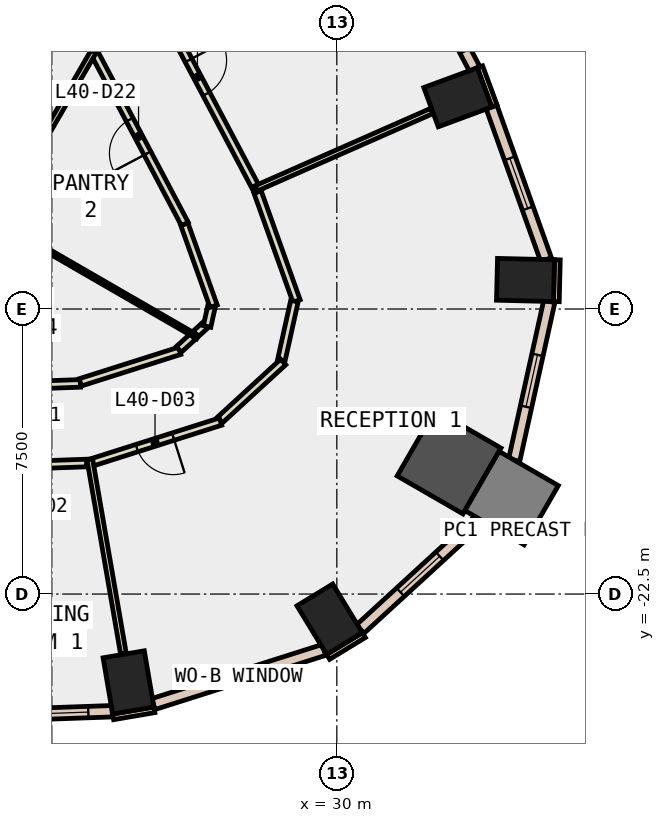
"""IFC4 building model, lengths in metres.
Left out: names, types, materials, properties, quantities, classifications, styles, units other than length and angle.
Written with IfcOpenShell. Run it as: python <this file> out.ifc"""

import sys

from ifc_helpers import new_model, si_unit, direction, frame, frame_2d, origin, origin_2d, place, context, subcontext, project, spatial, rectangle, extrude, element, fill, save


model = new_model("IFC4")
c1 = context("Model", 3, precision=1e-05, world=origin(), true_north=direction((0.0, 1.0)))
c2 = subcontext(c1, "Body", "Model", "MODEL_VIEW")
j1 = project(units=[si_unit("LENGTHUNIT", "METRE"), si_unit("PLANEANGLEUNIT", "RADIAN")], contexts=[c1])
p1 = place(None, origin())
s1 = spatial("IfcSite", under=j1, at=p1, CompositionType="ELEMENT")
p2 = place(p1, origin())
s2 = spatial("IfcBuilding", under=s1, at=p2, CompositionType="ELEMENT")
p3 = place(p2, frame((0.0, 0.0, 180.2)))
s3 = spatial("IfcBuildingStorey", under=s2, at=p3, CompositionType="ELEMENT", Elevation=180.2)
for number, where, z_axis, x_axis in (
    (1, (24.518, -24.825, -0.4), (0.0, 0.0, 1.0), (0.986, 0.168, 0.0)),
    (2, (29.812, -23.163, -0.4), (0.0, 0.0, 1.0), (0.854, 0.521, 0.0)),
):
    element("IfcColumn", number, at=place(p3, frame(where, z_axis=z_axis, x_axis=x_axis)), inside=s3, PredefinedType="COLUMN", context=c2, shape_type="SweptSolid", body=[
        extrude(rectangle(XDim=1.1, YDim=1.5, at=origin_2d()), origin(), (0.0, 0.0, 1.0), 4.0),
    ])
p4 = place(p3, frame((32.954, -19.025, -0.4), z_axis=(0.0, 0.0, 1.0), x_axis=(-0.866025403784, 0.5, 0.0)))
e3 = element("IfcColumn", 3, at=p4, inside=s3, PredefinedType="COLUMN", context=c2, shape_type="SweptSolid", body=[
    extrude(rectangle(XDim=2.0, YDim=2.0, at=origin_2d()), origin(), (0.0, 0.0, 1.0), 4.0),
])
for number, where, z_axis, x_axis in (
    (4, (34.965, -14.236, -0.4), (0.0, 0.0, 1.0), (0.024, 1.0, 0.0)),
    (5, (33.183, -9.429, -0.4), (0.0, 0.0, 1.0), (-0.347, 0.938, 0.0)),
):
    element("IfcColumn", number, at=place(p3, frame(where, z_axis=z_axis, x_axis=x_axis)), inside=s3, PredefinedType="COLUMN", context=c2, shape_type="SweptSolid", body=[
        extrude(rectangle(XDim=1.1, YDim=1.5, at=origin_2d()), origin(), (0.0, 0.0, 1.0), 4.0),
    ])
p5 = place(p3, frame((34.599, -19.975, -0.4), z_axis=(0.0, 0.0, 1.0), x_axis=(-0.866025403784, 0.5, 0.0)))
e6 = element("IfcColumn", 6, at=p5, inside=s3, PredefinedType="COLUMN", context=c2, shape_type="SweptSolid", body=[
    extrude(rectangle(XDim=1.8, YDim=1.8, at=origin_2d()), origin(), (0.0, 0.0, 1.0), 4.0),
])
p6 = place(p3, frame((34.147, -9.659, 0.0), z_axis=(0.0, 0.0, 1.0), x_axis=(-0.346229846278, 0.938149718087, 0.0)))
e7 = element("IfcWall", 7, at=p6, inside=s3, PredefinedType="STANDARD", context=c2, shape_type="SweptSolid", body=[
    extrude(rectangle(XDim=1.1, YDim=0.15, at=frame_2d((0.55, 0.0))), origin(), (0.0, 0.0, 1.0), 3.6),
])
p7 = place(p3, frame((24.114, -25.731, 0.0), z_axis=(0.0, 0.0, 1.0), x_axis=(0.985763338892, 0.168138751323, 0.0)))
e8 = element("IfcWall", 8, at=p7, inside=s3, PredefinedType="STANDARD", context=c2, shape_type="SweptSolid", body=[
    extrude(rectangle(XDim=1.101, YDim=0.15, at=frame_2d((0.55, 0.0))), origin(), (0.0, 0.0, 1.0), 3.6),
])
p8 = place(p3, frame((29.772, -24.153, 0.0), z_axis=(0.0, 0.0, 1.0), x_axis=(0.854005542721, 0.520263907071, 0.0)))
e9 = element("IfcWall", 9, at=p8, inside=s3, PredefinedType="STANDARD", context=c2, shape_type="SweptSolid", body=[
    extrude(rectangle(XDim=1.099, YDim=0.15, at=frame_2d((0.55, 0.0))), origin(), (0.0, 0.0, 1.0), 3.6),
])
p9 = place(p3, frame((35.777, -14.806, 0.0), z_axis=(0.0, 0.0, 1.0), x_axis=(0.023522901136, 0.999723298279, 0.0)))
e10 = element("IfcWall", 10, at=p9, inside=s3, PredefinedType="STANDARD", context=c2, shape_type="SweptSolid", body=[
    extrude(rectangle(XDim=1.1, YDim=0.15, at=frame_2d((0.55, 0.0))), origin(), (0.0, 0.0, 1.0), 3.6),
])
p10 = place(p3, frame((16.778, -25.843, 0.0), z_axis=(0.0, 0.0, 1.0), x_axis=(0.999368368263, 0.035536805082, 0.0)))
e11 = element("IfcWall", 11, at=p10, inside=s3, PredefinedType="STANDARD", context=c2, shape_type="SweptSolid", body=[
    extrude(rectangle(XDim=7.317, YDim=0.3, at=frame_2d((3.658, 0.0))), origin(), (0.0, 0.0, 1.0), 3.6),
])
p11 = place(p10, frame((0.629, 0.0, 0.9)))
e12 = element("IfcOpeningElement", 12, at=p11, cuts=e11, PredefinedType="OPENING", context=c2, shape_type="SweptSolid", body=[
    extrude(rectangle(XDim=2.4, YDim=2.6, at=frame_2d((1.2, 1.3))), frame((0.0, 0.16, 0.0), z_axis=(0.0, -1.0, 0.0), x_axis=(1.0, 0.0, 0.0)), (0.0, 0.0, 1.0), 0.32),
])
p12 = place(p10, frame((4.287, 0.0, 0.9)))
e13 = element("IfcOpeningElement", 13, at=p12, cuts=e11, PredefinedType="OPENING", context=c2, shape_type="SweptSolid", body=[
    extrude(rectangle(XDim=2.4, YDim=2.6, at=frame_2d((1.2, 1.3))), frame((0.0, 0.16, 0.0), z_axis=(0.0, -1.0, 0.0), x_axis=(1.0, 0.0, 0.0)), (0.0, 0.0, 1.0), 0.32),
])
p13 = place(p3, frame((25.172, -25.395, 0.0), z_axis=(0.0, 0.0, 1.0), x_axis=(0.953145379857, 0.302512619337, 0.0)))
e14 = element("IfcWall", 14, at=p13, inside=s3, PredefinedType="STANDARD", context=c2, shape_type="SweptSolid", body=[
    extrude(rectangle(XDim=4.711, YDim=0.3, at=frame_2d((2.355, 0.0))), origin(), (0.0, 0.0, 1.0), 3.6),
])
p14 = place(p13, frame((1.655, 0.0, 0.9)))
e15 = element("IfcOpeningElement", 15, at=p14, cuts=e14, PredefinedType="OPENING", context=c2, shape_type="SweptSolid", body=[
    extrude(rectangle(XDim=1.4, YDim=2.6, at=frame_2d((0.7, 1.3))), frame((0.0, 0.16, 0.0), z_axis=(0.0, -1.0, 0.0), x_axis=(1.0, 0.0, 0.0)), (0.0, 0.0, 1.0), 0.32),
])
p15 = place(p3, frame((30.614, -23.423, 0.0), z_axis=(0.0, 0.0, 1.0), x_axis=(0.737279680174, 0.675587650274, 0.0)))
e16 = element("IfcWall", 16, at=p15, inside=s3, PredefinedType="STANDARD", context=c2, shape_type="SweptSolid", body=[
    extrude(rectangle(XDim=4.278, YDim=0.3, at=frame_2d((2.139, 0.0))), origin(), (0.0, 0.0, 1.0), 3.6),
])
p16 = place(p15, frame((1.439, 0.0, 0.9)))
e17 = element("IfcOpeningElement", 17, at=p16, cuts=e16, PredefinedType="OPENING", context=c2, shape_type="SweptSolid", body=[
    extrude(rectangle(XDim=1.4, YDim=2.6, at=frame_2d((0.7, 1.3))), frame((0.0, 0.16, 0.0), z_axis=(0.0, -1.0, 0.0), x_axis=(1.0, 0.0, 0.0)), (0.0, 0.0, 1.0), 0.32),
])
p17 = place(p3, frame((34.667, -18.976, 0.0), z_axis=(0.0, 0.0, 1.0), x_axis=(0.216102175589, 0.976370754225, 0.0)))
e18 = element("IfcWall", 18, at=p17, inside=s3, PredefinedType="STANDARD", context=c2, shape_type="SweptSolid", body=[
    extrude(rectangle(XDim=4.276, YDim=0.3, at=frame_2d((2.138, 0.0))), origin(), (0.0, 0.0, 1.0), 3.6),
])
p18 = place(p17, frame((1.438, 0.0, 0.9)))
e19 = element("IfcOpeningElement", 19, at=p18, cuts=e18, PredefinedType="OPENING", context=c2, shape_type="SweptSolid", body=[
    extrude(rectangle(XDim=1.4, YDim=2.6, at=frame_2d((0.7, 1.3))), frame((0.0, 0.16, 0.0), z_axis=(0.0, -1.0, 0.0), x_axis=(1.0, 0.0, 0.0)), (0.0, 0.0, 1.0), 0.32),
])
p19 = place(p3, frame((35.506, -13.7, 0.0), z_axis=(0.0, 0.0, 1.0), x_axis=(-0.336652028742, 0.941629126325, 0.0)))
e20 = element("IfcWall", 20, at=p19, inside=s3, PredefinedType="STANDARD", context=c2, shape_type="SweptSolid", body=[
    extrude(rectangle(XDim=4.263, YDim=0.3, at=frame_2d((2.131, 0.0))), origin(), (0.0, 0.0, 1.0), 3.6),
])
p20 = place(p19, frame((1.431, 0.0, 0.9)))
e21 = element("IfcOpeningElement", 21, at=p20, cuts=e20, PredefinedType="OPENING", context=c2, shape_type="SweptSolid", body=[
    extrude(rectangle(XDim=1.4, YDim=2.6, at=frame_2d((0.7, 1.3))), frame((0.0, 0.16, 0.0), z_axis=(0.0, -1.0, 0.0), x_axis=(1.0, 0.0, 0.0)), (0.0, 0.0, 1.0), 0.32),
])
p21 = place(p3, frame((33.626, -8.68, 0.0), z_axis=(0.0, 0.0, 1.0), x_axis=(-0.467572383403, 0.883954787463, 0.0)))
e22 = element("IfcWall", 22, at=p21, inside=s3, PredefinedType="STANDARD", context=c2, shape_type="SweptSolid", body=[
    extrude(rectangle(XDim=6.119, YDim=0.3, at=frame_2d((3.06, 0.0))), origin(), (0.0, 0.0, 1.0), 3.6),
])
p22 = place(p21, frame((0.53, 0.0, 0.9)))
e23 = element("IfcOpeningElement", 23, at=p22, cuts=e22, PredefinedType="OPENING", context=c2, shape_type="SweptSolid", body=[
    extrude(rectangle(XDim=2.0, YDim=2.6, at=frame_2d((1.0, 1.3))), frame((0.0, 0.16, 0.0), z_axis=(0.0, -1.0, 0.0), x_axis=(1.0, 0.0, 0.0)), (0.0, 0.0, 1.0), 0.32),
])
p23 = place(p21, frame((3.589, 0.0, 0.9)))
e24 = element("IfcOpeningElement", 24, at=p23, cuts=e22, PredefinedType="OPENING", context=c2, shape_type="SweptSolid", body=[
    extrude(rectangle(XDim=2.0, YDim=2.6, at=frame_2d((1.0, 1.3))), frame((0.0, 0.16, 0.0), z_axis=(0.0, -1.0, 0.0), x_axis=(1.0, 0.0, 0.0)), (0.0, 0.0, 1.0), 0.32),
])
p24 = place(p3, frame((18.534, -17.125, 0.0), z_axis=(0.0, 0.0, 1.0), x_axis=(0.999367128298, 0.035571658351, 0.0)))
e25 = element("IfcWall", 25, at=p24, inside=s3, PredefinedType="PARTITIONING", context=c2, shape_type="SweptSolid", body=[
    extrude(rectangle(XDim=4.722, YDim=0.2, at=frame_2d((2.361, 0.0))), origin(), (0.0, 0.0, 1.0), 3.6),
])
p25 = place(p24, frame((1.861, 0.0, 0.0)))
e26 = element("IfcOpeningElement", 26, at=p25, cuts=e25, PredefinedType="OPENING", context=c2, shape_type="SweptSolid", body=[
    extrude(rectangle(XDim=1.0, YDim=2.1, at=frame_2d((0.5, 1.05))), frame((0.0, 0.11, 0.0), z_axis=(0.0, -1.0, 0.0), x_axis=(1.0, 0.0, 0.0)), (0.0, 0.0, 1.0), 0.22),
])
p26 = place(p3, frame((23.249, -16.93, 0.0), z_axis=(0.0, 0.0, 1.0), x_axis=(0.953158072423, 0.302472625167, 0.0)))
e27 = element("IfcWall", 27, at=p26, inside=s3, PredefinedType="PARTITIONING", context=c2, shape_type="SweptSolid", body=[
    extrude(rectangle(XDim=2.743, YDim=0.2, at=frame_2d((1.372, 0.0))), origin(), (0.0, 0.0, 1.0), 3.6),
])
p27 = place(p3, frame((25.842, -16.063, 0.0), z_axis=(0.0, 0.0, 1.0), x_axis=(0.738222400631, 0.674557400972, 0.0)))
e28 = element("IfcWall", 28, at=p27, inside=s3, PredefinedType="PARTITIONING", context=c2, shape_type="SweptSolid", body=[
    extrude(rectangle(XDim=0.502, YDim=0.2, at=frame_2d((0.251, 0.0))), origin(), (0.0, 0.0, 1.0), 3.6),
])
p28 = place(p3, frame((26.286, -15.656, 0.0), z_axis=(0.0, 0.0, 1.0), x_axis=(0.73763613927, 0.675198434568, 0.0)))
e29 = element("IfcWall", 29, at=p28, inside=s3, PredefinedType="PARTITIONING", context=c2, shape_type="SweptSolid", body=[
    extrude(rectangle(XDim=0.336, YDim=0.2, at=frame_2d((0.168, 0.0))), origin(), (0.0, 0.0, 1.0), 3.6),
])
p29 = place(p3, frame((26.586, -15.459, 0.0), z_axis=(0.0, 0.0, 1.0), x_axis=(0.215832999607, 0.976430292586, 0.0)))
e30 = element("IfcWall", 30, at=p29, inside=s3, PredefinedType="PARTITIONING", context=c2, shape_type="SweptSolid", body=[
    extrude(rectangle(XDim=0.542, YDim=0.2, at=frame_2d((0.271, 0.0))), origin(), (0.0, 0.0, 1.0), 3.6),
])
p30 = place(p3, frame((26.758, -14.926, 0.0), z_axis=(0.0, 0.0, 1.0), x_axis=(-0.33645112914, 0.941700927949, 0.0)))
e31 = element("IfcWall", 31, at=p30, inside=s3, PredefinedType="PARTITIONING", context=c2, shape_type="SweptSolid", body=[
    extrude(rectangle(XDim=2.292, YDim=0.2, at=frame_2d((1.146, 0.0))), origin(), (0.0, 0.0, 1.0), 3.6),
])
p31 = place(p3, frame((26.0, -12.762, 0.0), z_axis=(0.0, 0.0, 1.0), x_axis=(-0.467534471159, 0.883974840297, 0.0)))
e32 = element("IfcWall", 32, at=p31, inside=s3, PredefinedType="PARTITIONING", context=c2, shape_type="SweptSolid", body=[
    extrude(rectangle(XDim=5.208, YDim=0.2, at=frame_2d((2.604, 0.0))), origin(), (0.0, 0.0, 1.0), 3.6),
])
p32 = place(p31, frame((2.104, 0.0, 0.0)))
e33 = element("IfcOpeningElement", 33, at=p32, cuts=e32, PredefinedType="OPENING", context=c2, shape_type="SweptSolid", body=[
    extrude(rectangle(XDim=1.0, YDim=2.1, at=frame_2d((0.5, 1.05))), frame((0.0, 0.11, 0.0), z_axis=(0.0, -1.0, 0.0), x_axis=(1.0, 0.0, 0.0)), (0.0, 0.0, 1.0), 0.22),
])
p33 = place(p3, frame((23.415, -19.052, 0.0), z_axis=(0.0, 0.0, 1.0), x_axis=(-0.999358473407, -0.035813986516, 0.0)))
e34 = element("IfcWall", 34, at=p33, inside=s3, PredefinedType="PARTITIONING", context=c2, shape_type="SweptSolid", body=[
    extrude(rectangle(XDim=3.129, YDim=0.2, at=frame_2d((1.564, 0.0))), origin(), (0.0, 0.0, 1.0), 3.6),
])
p34 = place(p33, frame((1.065, 0.0, 0.0)))
e35 = element("IfcOpeningElement", 35, at=p34, cuts=e34, PredefinedType="OPENING", context=c2, shape_type="SweptSolid", body=[
    extrude(rectangle(XDim=1.0, YDim=2.1, at=frame_2d((0.5, 1.05))), frame((0.0, 0.11, 0.0), z_axis=(0.0, -1.0, 0.0), x_axis=(1.0, 0.0, 0.0)), (0.0, 0.0, 1.0), 0.22),
])
p35 = place(p3, frame((27.913, -11.919, 0.0), z_axis=(0.0, 0.0, 1.0), x_axis=(0.336864004528, -0.941553313654, 0.0)))
e36 = element("IfcWall", 36, at=p35, inside=s3, PredefinedType="PARTITIONING", context=c2, shape_type="SweptSolid", body=[
    extrude(rectangle(XDim=3.048, YDim=0.2, at=frame_2d((1.524, 0.0))), origin(), (0.0, 0.0, 1.0), 3.6),
])
p36 = place(p3, frame((28.884, -14.793, 0.0), z_axis=(0.0, 0.0, 1.0), x_axis=(-0.216223984898, -0.976343785946, 0.0)))
e37 = element("IfcWall", 37, at=p36, inside=s3, PredefinedType="PARTITIONING", context=c2, shape_type="SweptSolid", body=[
    extrude(rectangle(XDim=1.61, YDim=0.2, at=frame_2d((0.805, 0.0))), origin(), (0.0, 0.0, 1.0), 3.6),
])
p37 = place(p3, frame((28.588, -16.395, 0.0), z_axis=(0.0, 0.0, 1.0), x_axis=(-0.737118331834, -0.675763690112, 0.0)))
e38 = element("IfcWall", 38, at=p37, inside=s3, PredefinedType="PARTITIONING", context=c2, shape_type="SweptSolid", body=[
    extrude(rectangle(XDim=2.264, YDim=0.2, at=frame_2d((1.132, 0.0))), origin(), (0.0, 0.0, 1.0), 3.6),
])
p38 = place(p3, frame((26.94, -17.962, 0.0), z_axis=(0.0, 0.0, 1.0), x_axis=(-0.953197442309, -0.302348533941, 0.0)))
e39 = element("IfcWall", 39, at=p38, inside=s3, PredefinedType="PARTITIONING", context=c2, shape_type="SweptSolid", body=[
    extrude(rectangle(XDim=3.618, YDim=0.2, at=frame_2d((1.809, 0.0))), origin(), (0.0, 0.0, 1.0), 3.6),
])
p39 = place(p38, frame((1.309, 0.0, 0.0)))
e40 = element("IfcOpeningElement", 40, at=p39, cuts=e39, PredefinedType="OPENING", context=c2, shape_type="SweptSolid", body=[
    extrude(rectangle(XDim=1.0, YDim=2.1, at=frame_2d((0.5, 1.05))), frame((0.0, 0.11, 0.0), z_axis=(0.0, -1.0, 0.0), x_axis=(1.0, 0.0, 0.0)), (0.0, 0.0, 1.0), 0.22),
])
p40 = place(p3, frame((24.738, -5.885, 0.0), z_axis=(0.0, 0.0, 1.0), x_axis=(0.467616297571, -0.883931557444, 0.0)))
e41 = element("IfcWall", 41, at=p40, inside=s3, PredefinedType="PARTITIONING", context=c2, shape_type="SweptSolid", body=[
    extrude(rectangle(XDim=6.82, YDim=0.2, at=frame_2d((3.41, 0.0))), origin(), (0.0, 0.0, 1.0), 3.6),
])
p41 = place(p40, frame((2.91, 0.0, 0.0)))
e42 = element("IfcOpeningElement", 42, at=p41, cuts=e41, PredefinedType="OPENING", context=c2, shape_type="SweptSolid", body=[
    extrude(rectangle(XDim=1.0, YDim=2.1, at=frame_2d((0.5, 1.05))), frame((0.0, 0.11, 0.0), z_axis=(0.0, -1.0, 0.0), x_axis=(1.0, 0.0, 0.0)), (0.0, 0.0, 1.0), 0.22),
])
p42 = place(p3, frame((23.6, -8.224, 0.0), z_axis=(0.0, 0.0, 1.0), x_axis=(-0.500120854176, -0.865955617349, 0.0)))
e43 = element("IfcWall", 43, at=p42, inside=s3, PredefinedType="PARTITIONING", context=c2, shape_type="SweptSolid", body=[
    extrude(rectangle(XDim=4.827, YDim=0.15, at=frame_2d((2.414, 0.0))), origin(), (0.0, 0.0, 1.0), 3.6),
])
p43 = place(p3, frame((20.964, -12.638, 0.0), z_axis=(0.0, 0.0, 1.0), x_axis=(0.865981737723, -0.500075624211, 0.0)))
e44 = element("IfcWall", 44, at=p43, inside=s3, PredefinedType="PARTITIONING", context=c2, shape_type="SweptSolid", body=[
    extrude(rectangle(XDim=6.203, YDim=0.1, at=frame_2d((3.102, 0.0))), origin(), (0.0, 0.0, 1.0), 3.6),
])
p44 = place(p3, frame((23.498, -18.95, 0.0), z_axis=(0.0, 0.0, 1.0), x_axis=(0.170609023531, -0.985338805229, 0.0)))
e45 = element("IfcWall", 45, at=p44, inside=s3, PredefinedType="PARTITIONING", context=c2, shape_type="SweptSolid", body=[
    extrude(rectangle(XDim=5.193, YDim=0.15, at=frame_2d((2.597, 0.0))), origin(), (0.0, 0.0, 1.0), 3.6),
])
p45 = place(p3, frame((27.88, -11.825, 0.0), z_axis=(0.0, 0.0, 1.0), x_axis=(0.915110098234, 0.403204052696, 0.0)))
e46 = element("IfcWall", 46, at=p45, inside=s3, PredefinedType="PARTITIONING", context=c2, shape_type="SweptSolid", body=[
    extrude(rectangle(XDim=5.044, YDim=0.15, at=frame_2d((2.522, 0.0))), origin(), (0.0, 0.0, 1.0), 3.6),
])
p46 = place(p12, origin())
e47 = element("IfcWindow", 47, at=p46, inside=s3, PartitioningType="SINGLE_PANEL", PredefinedType="WINDOW", context=c2, shape_type="SweptSolid", body=[
    extrude(rectangle(XDim=2.4, YDim=2.6, at=frame_2d((1.2, 1.3))), frame((0.0, 0.03, 0.0), z_axis=(0.0, -1.0, 0.0), x_axis=(1.0, 0.0, 0.0)), (0.0, 0.0, 1.0), 0.06),
])
fill(e13, e47)
p47 = place(p14, origin())
e48 = element("IfcWindow", 48, at=p47, inside=s3, PartitioningType="SINGLE_PANEL", PredefinedType="WINDOW", context=c2, shape_type="SweptSolid", body=[
    extrude(rectangle(XDim=1.4, YDim=2.6, at=frame_2d((0.7, 1.3))), frame((0.0, 0.03, 0.0), z_axis=(0.0, -1.0, 0.0), x_axis=(1.0, 0.0, 0.0)), (0.0, 0.0, 1.0), 0.06),
])
fill(e15, e48)
p48 = place(p16, origin())
e49 = element("IfcWindow", 49, at=p48, inside=s3, PartitioningType="SINGLE_PANEL", PredefinedType="WINDOW", context=c2, shape_type="SweptSolid", body=[
    extrude(rectangle(XDim=1.4, YDim=2.6, at=frame_2d((0.7, 1.3))), frame((0.0, 0.03, 0.0), z_axis=(0.0, -1.0, 0.0), x_axis=(1.0, 0.0, 0.0)), (0.0, 0.0, 1.0), 0.06),
])
fill(e17, e49)
p49 = place(p18, origin())
e50 = element("IfcWindow", 50, at=p49, inside=s3, PartitioningType="SINGLE_PANEL", PredefinedType="WINDOW", context=c2, shape_type="SweptSolid", body=[
    extrude(rectangle(XDim=1.4, YDim=2.6, at=frame_2d((0.7, 1.3))), frame((0.0, 0.03, 0.0), z_axis=(0.0, -1.0, 0.0), x_axis=(1.0, 0.0, 0.0)), (0.0, 0.0, 1.0), 0.06),
])
fill(e19, e50)
p50 = place(p20, origin())
e51 = element("IfcWindow", 51, at=p50, inside=s3, PartitioningType="SINGLE_PANEL", PredefinedType="WINDOW", context=c2, shape_type="SweptSolid", body=[
    extrude(rectangle(XDim=1.4, YDim=2.6, at=frame_2d((0.7, 1.3))), frame((0.0, 0.03, 0.0), z_axis=(0.0, -1.0, 0.0), x_axis=(1.0, 0.0, 0.0)), (0.0, 0.0, 1.0), 0.06),
])
fill(e21, e51)
p51 = place(p39, origin())
e52 = element("IfcDoor", 52, at=p51, inside=s3, OperationType="SINGLE_SWING_LEFT", PredefinedType="DOOR", context=c2, shape_type="SweptSolid", body=[
    extrude(rectangle(XDim=1.0, YDim=2.1, at=frame_2d((0.5, 1.05))), frame((0.0, 0.025, 0.0), z_axis=(0.0, -1.0, 0.0), x_axis=(1.0, 0.0, 0.0)), (0.0, 0.0, 1.0), 0.05),
])
fill(e40, e52)
p52 = place(p41, origin())
e53 = element("IfcDoor", 53, at=p52, inside=s3, OperationType="SINGLE_SWING_LEFT", PredefinedType="DOOR", context=c2, shape_type="SweptSolid", body=[
    extrude(rectangle(XDim=1.0, YDim=2.1, at=frame_2d((0.5, 1.05))), frame((0.0, 0.025, 0.0), z_axis=(0.0, -1.0, 0.0), x_axis=(1.0, 0.0, 0.0)), (0.0, 0.0, 1.0), 0.05),
])
fill(e42, e53)
p53 = place(p32, origin())
e54 = element("IfcDoor", 54, at=p53, inside=s3, OperationType="SINGLE_SWING_LEFT", PredefinedType="DOOR", context=c2, shape_type="SweptSolid", body=[
    extrude(rectangle(XDim=1.0, YDim=2.1, at=frame_2d((0.5, 1.05))), frame((0.0, 0.025, 0.0), z_axis=(0.0, -1.0, 0.0), x_axis=(1.0, 0.0, 0.0)), (0.0, 0.0, 1.0), 0.05),
])
fill(e33, e54)
save(model, sys.argv[1])
